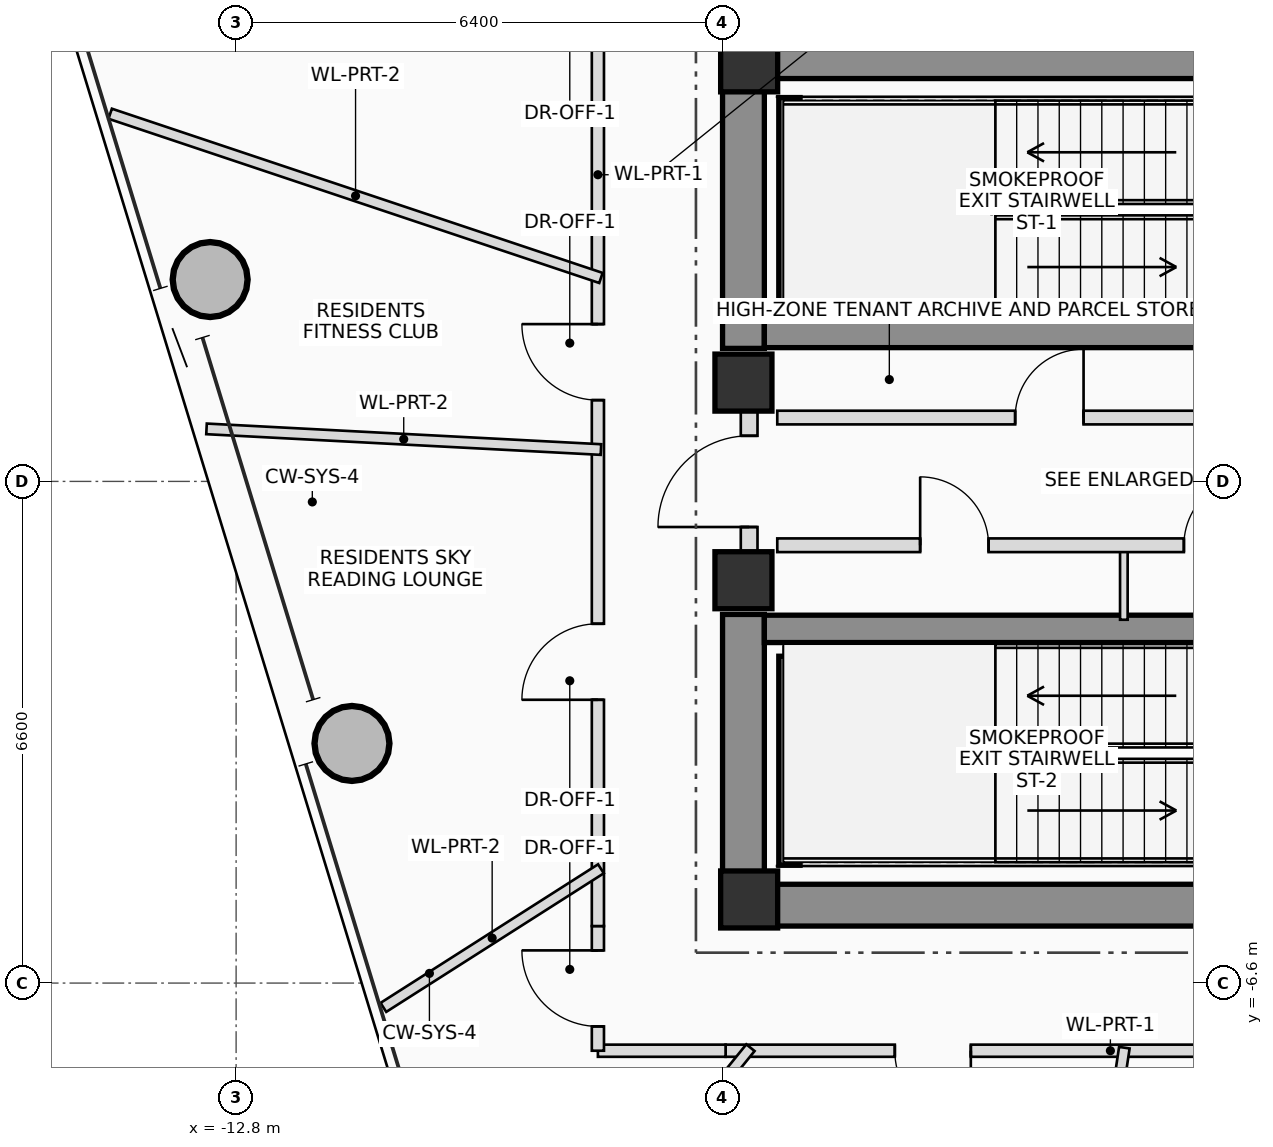
"""IFC4 building model, lengths in metres.
Left out: names, types, materials, properties, quantities, classifications, styles, units other than length and angle.
Written with IfcOpenShell. Run it as: python <this file> out.ifc"""

import sys

from ifc_helpers import new_model, si_unit, direction, frame, frame_2d, origin, origin_2d, place, context, subcontext, project, spatial, rectangle, hollow_circle, extrude, source, transform, mapped, element, fill, save


model = new_model("IFC4")
c1 = context("Model", 3, precision=1e-05, world=origin(), true_north=direction((0.0, 1.0)))
c2 = subcontext(c1, "Body", "Model", "MODEL_VIEW")
j1 = project(units=[si_unit("LENGTHUNIT", "METRE"), si_unit("PLANEANGLEUNIT", "RADIAN")], contexts=[c1])
p1 = place(None, origin())
s1 = spatial("IfcSite", under=j1, at=p1, CompositionType="ELEMENT")
p2 = place(p1, origin())
s2 = spatial("IfcBuilding", under=s1, at=p2, CompositionType="ELEMENT")
p3 = place(p2, frame((0.0, 0.0, 228.65)))
s3 = spatial("IfcBuildingStorey", under=s2, at=p3, CompositionType="ELEMENT", Elevation=228.65)
m1 = source(origin(), c2, "Body", "SweptSolid", [
    extrude(rectangle(XDim=0.75, YDim=0.75, at=origin_2d()), origin(), (0.0, 0.0, 1.0), 3.4),
])
for number, where, z_axis, x_axis in (
    (1, (-6.05, -5.5, 0.0), (0.0, 0.0, 1.0), (1.0, 0.0, 0.0)),
    (2, (-6.05, 5.5, 0.0), (0.0, 0.0, 1.0), (1.0, 0.0, 0.0)),
):
    element("IfcColumn", number, at=place(p3, frame(where, z_axis=z_axis, x_axis=x_axis)), inside=s3, PredefinedType="COLUMN", context=c2, shape_type="MappedRepresentation", body=[
        mapped(m1, transform((0.0, 0.0, 0.0), scale=1.0)),
    ])
p4 = place(p3, frame((-6.4, 5.575, 0.0), z_axis=(0.0, 0.0, 1.0), x_axis=(1.0, 0.0, 0.0)))
e3 = element("IfcWall", 3, at=p4, inside=s3, PredefinedType="SHEAR", context=c2, shape_type="SweptSolid", body=[
    extrude(rectangle(XDim=12.8, YDim=0.55, at=frame_2d((6.4, 0.0))), origin(), (0.0, 0.0, 1.0), 3.4),
])
p5 = place(p4, frame((8.6, 0.0, 0.0)))
e4 = element("IfcOpeningElement", 4, at=p5, cuts=e3, PredefinedType="OPENING", context=c2, shape_type="SweptSolid", body=[
    extrude(rectangle(XDim=1.2, YDim=2.2, at=frame_2d((0.6, 1.1))), frame((0.0, 0.285, 0.0), z_axis=(0.0, -1.0, 0.0), x_axis=(1.0, 0.0, 0.0)), (0.0, 0.0, 1.0), 0.57),
])
p6 = place(p3, frame((-6.4, -5.575, 0.0), z_axis=(0.0, 0.0, 1.0), x_axis=(1.0, 0.0, 0.0)))
e5 = element("IfcWall", 5, at=p6, inside=s3, PredefinedType="SHEAR", context=c2, shape_type="SweptSolid", body=[
    extrude(rectangle(XDim=12.8, YDim=0.55, at=frame_2d((6.4, 0.0))), origin(), (0.0, 0.0, 1.0), 3.4),
])
p7 = place(p6, frame((8.6, 0.0, 0.0)))
e6 = element("IfcOpeningElement", 6, at=p7, cuts=e5, PredefinedType="OPENING", context=c2, shape_type="SweptSolid", body=[
    extrude(rectangle(XDim=1.2, YDim=2.2, at=frame_2d((0.6, 1.1))), frame((0.0, 0.285, 0.0), z_axis=(0.0, -1.0, 0.0), x_axis=(1.0, 0.0, 0.0)), (0.0, 0.0, 1.0), 0.57),
])
for number, where, z_axis, x_axis in (
    (7, (-6.125, -5.3, 0.0), (0.0, 0.0, 1.0), (0.0, 1.0, 0.0)),
    (8, (-6.125, 1.75, 0.0), (0.0, 0.0, 1.0), (0.0, 1.0, 0.0)),
):
    element("IfcWall", number, at=place(p3, frame(where, z_axis=z_axis, x_axis=x_axis)), inside=s3, PredefinedType="SHEAR", context=c2, shape_type="SweptSolid", body=[
        extrude(rectangle(XDim=3.55, YDim=0.55, at=frame_2d((1.775, 0.0))), origin(), (0.0, 0.0, 1.0), 3.4),
    ])
for number, where, z_axis, x_axis in (
    (9, (-5.85, 1.94, 0.0), (0.0, 0.0, 1.0), (1.0, 0.0, 0.0)),
    (10, (-5.85, -1.94, 0.0), (0.0, 0.0, 1.0), (1.0, 0.0, 0.0)),
):
    element("IfcWall", number, at=place(p3, frame(where, z_axis=z_axis, x_axis=x_axis)), inside=s3, PredefinedType="SHEAR", context=c2, shape_type="SweptSolid", body=[
        extrude(rectangle(XDim=11.7, YDim=0.36, at=frame_2d((5.85, 0.0))), origin(), (0.0, 0.0, 1.0), 3.4),
    ])
for number, where, z_axis, x_axis in (
    (11, (-5.52, 2.3, 0.0), (0.0, 0.0, 1.0), (0.0, 1.0, 0.0)),
    (12, (-5.52, -5.05, 0.0), (0.0, 0.0, 1.0), (0.0, 1.0, 0.0)),
):
    element("IfcWall", number, at=place(p3, frame(where, z_axis=z_axis, x_axis=x_axis)), inside=s3, PredefinedType="SHEAR", context=c2, shape_type="SweptSolid", body=[
        extrude(rectangle(XDim=2.75, YDim=0.28, at=frame_2d((1.375, 0.0))), origin(), (0.0, 0.0, 1.0), 3.4),
    ])
for number, where, z_axis, x_axis in (
    (13, (-6.125, -1.3, 0.0), (0.0, 0.0, 1.0), (1.0, 0.0, 0.0)),
    (14, (-6.125, 1.3, 0.0), (0.0, 0.0, 1.0), (1.0, 0.0, 0.0)),
):
    element("IfcColumn", number, at=place(p3, frame(where, z_axis=z_axis, x_axis=x_axis)), inside=s3, PredefinedType="COLUMN", context=c2, shape_type="MappedRepresentation", body=[
        mapped(m1, transform((0.0, 0.0, 0.0), scale=1.0)),
    ])
m2 = source(origin(), c2, "Body", "SweptSolid", [
    extrude(hollow_circle(Radius=0.5, WallThickness=0.04, at=origin_2d()), origin(), (0.0, 0.0, 1.0), 3.4),
])
for number, where, z_axis, x_axis in (
    (15, (-13.142, 2.656, 0.0), (0.0, 0.0, 1.0), (1.0, 0.0, 0.0)),
    (16, (-11.276, -3.448, 0.0), (0.0, 0.0, 1.0), (1.0, 0.0, 0.0)),
):
    element("IfcColumn", number, at=place(p3, frame(where, z_axis=z_axis, x_axis=x_axis)), inside=s3, PredefinedType="COLUMN", context=c2, shape_type="MappedRepresentation", body=[
        mapped(m2, transform((0.0, 0.0, 0.0), scale=1.0)),
    ])
p8 = place(p3, frame((-6.05, -0.95, 0.0), z_axis=(0.0, 0.0, 1.0), x_axis=(0.0, 1.0, 0.0)))
e17 = element("IfcWall", 17, at=p8, inside=s3, PredefinedType="PLUMBINGWALL", context=c2, shape_type="SweptSolid", body=[
    extrude(rectangle(XDim=1.9, YDim=0.22, at=frame_2d((0.95, 0.0))), origin(), (0.0, 0.0, 1.0), 2.18),
])
p9 = place(p8, frame((0.35, 0.0, 0.0)))
e18 = element("IfcOpeningElement", 18, at=p9, cuts=e17, PredefinedType="OPENING", context=c2, shape_type="SweptSolid", body=[
    extrude(rectangle(XDim=1.2, YDim=2.2, at=frame_2d((0.6, 1.1))), frame((0.0, 0.12, 0.0), z_axis=(0.0, -1.0, 0.0), x_axis=(1.0, 0.0, 0.0)), (0.0, 0.0, 1.0), 0.24),
])
p10 = place(p3, frame((-1.12, -1.82, 0.0), z_axis=(0.0, 0.0, 1.0), x_axis=(0.0, 1.0, 0.0)))
e19 = element("IfcWall", 19, at=p10, inside=s3, PredefinedType="PARTITIONING", context=c2, shape_type="SweptSolid", body=[
    extrude(rectangle(XDim=0.98, YDim=0.1, at=frame_2d((0.49, 0.0))), origin(), (0.0, 0.0, 1.0), 3.2),
])
p11 = place(p3, frame((-5.68, 0.84, 0.0), z_axis=(0.0, 0.0, 1.0), x_axis=(1.0, 0.0, 0.0)))
e20 = element("IfcWall", 20, at=p11, inside=s3, PredefinedType="PLUMBINGWALL", context=c2, shape_type="SweptSolid", body=[
    extrude(rectangle(XDim=11.33, YDim=0.18, at=frame_2d((5.665, 0.0))), origin(), (0.0, 0.0, 1.0), 3.2),
])
p12 = place(p11, frame((3.13, 0.0, 0.0)))
e21 = element("IfcOpeningElement", 21, at=p12, cuts=e20, PredefinedType="OPENING", context=c2, shape_type="SweptSolid", body=[
    extrude(rectangle(XDim=0.9, YDim=2.05, at=frame_2d((0.45, 1.025))), frame((0.0, 0.1, 0.0), z_axis=(0.0, -1.0, 0.0), x_axis=(1.0, 0.0, 0.0)), (0.0, 0.0, 1.0), 0.2),
])
p13 = place(p11, frame((7.33, 0.0, 0.0)))
e22 = element("IfcOpeningElement", 22, at=p13, cuts=e20, PredefinedType="OPENING", context=c2, shape_type="SweptSolid", body=[
    extrude(rectangle(XDim=1.1, YDim=2.2, at=frame_2d((0.55, 1.1))), frame((0.0, 0.1, 0.0), z_axis=(0.0, -1.0, 0.0), x_axis=(1.0, 0.0, 0.0)), (0.0, 0.0, 1.0), 0.2),
])
p14 = place(p11, frame((8.83, 0.0, 0.0)))
e23 = element("IfcOpeningElement", 23, at=p14, cuts=e20, PredefinedType="OPENING", context=c2, shape_type="SweptSolid", body=[
    extrude(rectangle(XDim=1.1, YDim=2.2, at=frame_2d((0.55, 1.1))), frame((0.0, 0.1, 0.0), z_axis=(0.0, -1.0, 0.0), x_axis=(1.0, 0.0, 0.0)), (0.0, 0.0, 1.0), 0.2),
])
p15 = place(p3, frame((-5.68, -0.84, 0.0), z_axis=(0.0, 0.0, 1.0), x_axis=(1.0, 0.0, 0.0)))
e24 = element("IfcWall", 24, at=p15, inside=s3, PredefinedType="PLUMBINGWALL", context=c2, shape_type="SweptSolid", body=[
    extrude(rectangle(XDim=10.22, YDim=0.18, at=frame_2d((5.11, 0.0))), origin(), (0.0, 0.0, 1.0), 3.2),
])
p16 = place(p15, frame((1.88, 0.0, 0.0)))
e25 = element("IfcOpeningElement", 25, at=p16, cuts=e24, PredefinedType="OPENING", context=c2, shape_type="SweptSolid", body=[
    extrude(rectangle(XDim=0.9, YDim=2.05, at=frame_2d((0.45, 1.025))), frame((0.0, 0.1, 0.0), z_axis=(0.0, -1.0, 0.0), x_axis=(1.0, 0.0, 0.0)), (0.0, 0.0, 1.0), 0.2),
])
p17 = place(p15, frame((5.35, 0.0, 0.0)))
e26 = element("IfcOpeningElement", 26, at=p17, cuts=e24, PredefinedType="OPENING", context=c2, shape_type="SweptSolid", body=[
    extrude(rectangle(XDim=0.9, YDim=2.05, at=frame_2d((0.45, 1.025))), frame((0.0, 0.1, 0.0), z_axis=(0.0, -1.0, 0.0), x_axis=(1.0, 0.0, 0.0)), (0.0, 0.0, 1.0), 0.2),
])
p18 = place(p15, frame((7.33, 0.0, 0.0)))
e27 = element("IfcOpeningElement", 27, at=p18, cuts=e24, PredefinedType="OPENING", context=c2, shape_type="SweptSolid", body=[
    extrude(rectangle(XDim=1.1, YDim=2.2, at=frame_2d((0.55, 1.1))), frame((0.0, 0.1, 0.0), z_axis=(0.0, -1.0, 0.0), x_axis=(1.0, 0.0, 0.0)), (0.0, 0.0, 1.0), 0.2),
])
p19 = place(p15, frame((9.02, 0.0, 0.0)))
e28 = element("IfcOpeningElement", 28, at=p19, cuts=e24, PredefinedType="OPENING", context=c2, shape_type="SweptSolid", body=[
    extrude(rectangle(XDim=0.9, YDim=2.05, at=frame_2d((0.45, 1.025))), frame((0.0, 0.1, 0.0), z_axis=(0.0, -1.0, 0.0), x_axis=(1.0, 0.0, 0.0)), (0.0, 0.0, 1.0), 0.2),
])
p20 = place(p3, frame((3.45, -7.49, 0.0), z_axis=(0.0, 0.0, 1.0), x_axis=(-1.0, 0.0, 0.0)))
e29 = element("IfcWall", 29, at=p20, inside=s3, PredefinedType="PARTITIONING", context=c2, shape_type="SweptSolid", body=[
    extrude(rectangle(XDim=9.81, YDim=0.16, at=frame_2d((4.905, 0.0))), origin(), (0.0, 0.0, 1.0), 2.605),
])
p21 = place(p20, frame((1.911, 0.0, 0.0)))
e30 = element("IfcOpeningElement", 30, at=p21, cuts=e29, PredefinedType="OPENING", context=c2, shape_type="SweptSolid", body=[
    extrude(rectangle(XDim=1.0, YDim=2.25, at=frame_2d((0.5, 1.125))), frame((0.0, 0.09, 0.0), z_axis=(0.0, -1.0, 0.0), x_axis=(1.0, 0.0, 0.0)), (0.0, 0.0, 1.0), 0.18),
])
p22 = place(p20, frame((6.583, 0.0, 0.0)))
e31 = element("IfcOpeningElement", 31, at=p22, cuts=e29, PredefinedType="OPENING", context=c2, shape_type="SweptSolid", body=[
    extrude(rectangle(XDim=1.0, YDim=2.25, at=frame_2d((0.5, 1.125))), frame((0.0, 0.09, 0.0), z_axis=(0.0, -1.0, 0.0), x_axis=(1.0, 0.0, 0.0)), (0.0, 0.0, 1.0), 0.18),
])
p23 = place(p3, frame((-6.36, -7.49, 0.0), z_axis=(0.0, 0.0, 1.0), x_axis=(-1.0, 0.0, 0.0)))
e32 = element("IfcWall", 32, at=p23, inside=s3, PredefinedType="PARTITIONING", context=c2, shape_type="SweptSolid", body=[
    extrude(rectangle(XDim=1.68, YDim=0.16, at=frame_2d((0.84, 0.0))), origin(), (0.0, 0.0, 1.0), 2.605),
])
p24 = place(p3, frame((-8.04, -7.49, 0.0), z_axis=(0.0, 0.0, 1.0), x_axis=(0.0, 1.0, 0.0)))
e33 = element("IfcWall", 33, at=p24, inside=s3, PredefinedType="PARTITIONING", context=c2, shape_type="SweptSolid", body=[
    extrude(rectangle(XDim=1.64, YDim=0.16, at=frame_2d((0.82, 0.0))), origin(), (0.0, 0.0, 1.0), 2.805),
])
p25 = place(p24, frame((0.32, 0.0, 0.0)))
e34 = element("IfcOpeningElement", 34, at=p25, cuts=e33, PredefinedType="OPENING", context=c2, shape_type="SweptSolid", body=[
    extrude(rectangle(XDim=1.0, YDim=2.25, at=frame_2d((0.5, 1.125))), frame((0.0, 0.09, 0.0), z_axis=(0.0, -1.0, 0.0), x_axis=(1.0, 0.0, 0.0)), (0.0, 0.0, 1.0), 0.18),
])
p26 = place(p3, frame((-8.04, -5.85, 0.0), z_axis=(0.0, 0.0, 1.0), x_axis=(0.0, 1.0, 0.0)))
e35 = element("IfcWall", 35, at=p26, inside=s3, PredefinedType="PARTITIONING", context=c2, shape_type="SweptSolid", body=[
    extrude(rectangle(XDim=11.7, YDim=0.16, at=frame_2d((5.85, 0.0))), origin(), (0.0, 0.0, 1.0), 2.605),
])
p27 = place(p26, frame((2.977, 0.0, 0.0)))
e36 = element("IfcOpeningElement", 36, at=p27, cuts=e35, PredefinedType="OPENING", context=c2, shape_type="SweptSolid", body=[
    extrude(rectangle(XDim=1.0, YDim=2.25, at=frame_2d((0.5, 1.125))), frame((0.0, 0.09, 0.0), z_axis=(0.0, -1.0, 0.0), x_axis=(1.0, 0.0, 0.0)), (0.0, 0.0, 1.0), 0.18),
])
p28 = place(p26, frame((6.919, 0.0, 0.0)))
e37 = element("IfcOpeningElement", 37, at=p28, cuts=e35, PredefinedType="OPENING", context=c2, shape_type="SweptSolid", body=[
    extrude(rectangle(XDim=1.0, YDim=2.25, at=frame_2d((0.5, 1.125))), frame((0.0, 0.09, 0.0), z_axis=(0.0, -1.0, 0.0), x_axis=(1.0, 0.0, 0.0)), (0.0, 0.0, 1.0), 0.18),
])
p29 = place(p3, frame((-8.0, 2.677, 0.0), z_axis=(0.0, 0.0, 1.0), x_axis=(-0.948324112853, 0.317303288639, 0.0)))
e38 = element("IfcWall", 38, at=p29, inside=s3, PredefinedType="PARTITIONING", context=c2, shape_type="SweptSolid", body=[
    extrude(rectangle(XDim=6.809, YDim=0.14, at=frame_2d((3.404, 0.0))), origin(), (0.0, 0.0, 1.0), 2.605),
])
p30 = place(p3, frame((-8.0, 0.419, 0.0), z_axis=(0.0, 0.0, 1.0), x_axis=(-0.998629485047, 0.052336904702, 0.0)))
e39 = element("IfcWall", 39, at=p30, inside=s3, PredefinedType="PARTITIONING", context=c2, shape_type="SweptSolid", body=[
    extrude(rectangle(XDim=5.197, YDim=0.14, at=frame_2d((2.598, 0.0))), origin(), (0.0, 0.0, 1.0), 2.765),
])
p31 = place(p3, frame((-8.0, -5.097, 0.0), z_axis=(0.0, 0.0, 1.0), x_axis=(-0.843391828446, -0.537299007733, 0.0)))
e40 = element("IfcWall", 40, at=p31, inside=s3, PredefinedType="PARTITIONING", context=c2, shape_type="SweptSolid", body=[
    extrude(rectangle(XDim=3.394, YDim=0.14, at=frame_2d((1.697, 0.0))), origin(), (0.0, 0.0, 1.0), 2.765),
])
p32 = place(p3, frame((-6.033, -7.45, 0.0), z_axis=(0.0, 0.0, 1.0), x_axis=(-0.629318234002, -0.777147708195, 0.0)))
e41 = element("IfcWall", 41, at=p32, inside=s3, PredefinedType="PARTITIONING", context=c2, shape_type="SweptSolid", body=[
    extrude(rectangle(XDim=5.384, YDim=0.14, at=frame_2d((2.692, 0.0))), origin(), (0.0, 0.0, 1.0), 2.605),
])
p33 = place(p3, frame((-1.113, -7.45, 0.0), z_axis=(0.0, 0.0, 1.0), x_axis=(-0.147817313856, -0.989014682259, 0.0)))
e42 = element("IfcWall", 42, at=p33, inside=s3, PredefinedType="PARTITIONING", context=c2, shape_type="SweptSolid", body=[
    extrude(rectangle(XDim=10.384, YDim=0.14, at=frame_2d((5.192, 0.0))), origin(), (0.0, 0.0, 1.0), 2.805),
])
p34 = place(p9, origin())
e43 = element("IfcDoor", 43, at=p34, inside=s3, OperationType="SINGLE_SWING_LEFT", PredefinedType="DOOR", context=c2, shape_type="SweptSolid", body=[
    extrude(rectangle(XDim=1.2, YDim=2.2, at=frame_2d((0.6, 1.1))), frame((0.0, 0.025, 0.0), z_axis=(0.0, -1.0, 0.0), x_axis=(1.0, 0.0, 0.0)), (0.0, 0.0, 1.0), 0.05),
])
fill(e18, e43)
p35 = place(p12, origin())
e44 = element("IfcDoor", 44, at=p35, inside=s3, OperationType="SINGLE_SWING_RIGHT", PredefinedType="DOOR", context=c2, shape_type="SweptSolid", body=[
    extrude(rectangle(XDim=0.9, YDim=2.05, at=frame_2d((0.45, 1.025))), frame((0.0, 0.025, 0.0), z_axis=(0.0, -1.0, 0.0), x_axis=(1.0, 0.0, 0.0)), (0.0, 0.0, 1.0), 0.05),
])
fill(e21, e44)
p36 = place(p16, origin())
e45 = element("IfcDoor", 45, at=p36, inside=s3, OperationType="SINGLE_SWING_LEFT", PredefinedType="DOOR", context=c2, shape_type="SweptSolid", body=[
    extrude(rectangle(XDim=0.9, YDim=2.05, at=frame_2d((0.45, 1.025))), frame((0.0, 0.025, 0.0), z_axis=(0.0, -1.0, 0.0), x_axis=(1.0, 0.0, 0.0)), (0.0, 0.0, 1.0), 0.05),
])
fill(e25, e45)
p37 = place(p17, origin())
e46 = element("IfcDoor", 46, at=p37, inside=s3, OperationType="SINGLE_SWING_RIGHT", PredefinedType="DOOR", context=c2, shape_type="SweptSolid", body=[
    extrude(rectangle(XDim=0.9, YDim=2.05, at=frame_2d((0.45, 1.025))), frame((0.0, 0.025, 0.0), z_axis=(0.0, -1.0, 0.0), x_axis=(1.0, 0.0, 0.0)), (0.0, 0.0, 1.0), 0.05),
])
fill(e26, e46)
p38 = place(p22, origin())
e47 = element("IfcDoor", 47, at=p38, inside=s3, OperationType="SINGLE_SWING_LEFT", PredefinedType="DOOR", context=c2, shape_type="SweptSolid", body=[
    extrude(rectangle(XDim=1.0, YDim=2.25, at=frame_2d((0.5, 1.125))), frame((0.0, 0.025, 0.0), z_axis=(0.0, -1.0, 0.0), x_axis=(1.0, 0.0, 0.0)), (0.0, 0.0, 1.0), 0.05),
])
fill(e31, e47)
p39 = place(p25, origin())
e48 = element("IfcDoor", 48, at=p39, inside=s3, OperationType="SINGLE_SWING_RIGHT", PredefinedType="DOOR", context=c2, shape_type="SweptSolid", body=[
    extrude(rectangle(XDim=1.0, YDim=2.25, at=frame_2d((0.5, 1.125))), frame((0.0, 0.025, 0.0), z_axis=(0.0, -1.0, 0.0), x_axis=(1.0, 0.0, 0.0)), (0.0, 0.0, 1.0), 0.05),
])
fill(e34, e48)
p40 = place(p27, origin())
e49 = element("IfcDoor", 49, at=p40, inside=s3, OperationType="SINGLE_SWING_LEFT", PredefinedType="DOOR", context=c2, shape_type="SweptSolid", body=[
    extrude(rectangle(XDim=1.0, YDim=2.25, at=frame_2d((0.5, 1.125))), frame((0.0, 0.025, 0.0), z_axis=(0.0, -1.0, 0.0), x_axis=(1.0, 0.0, 0.0)), (0.0, 0.0, 1.0), 0.05),
])
fill(e36, e49)
p41 = place(p28, origin())
e50 = element("IfcDoor", 50, at=p41, inside=s3, OperationType="SINGLE_SWING_RIGHT", PredefinedType="DOOR", context=c2, shape_type="SweptSolid", body=[
    extrude(rectangle(XDim=1.0, YDim=2.25, at=frame_2d((0.5, 1.125))), frame((0.0, 0.025, 0.0), z_axis=(0.0, -1.0, 0.0), x_axis=(1.0, 0.0, 0.0)), (0.0, 0.0, 1.0), 0.05),
])
fill(e37, e50)
save(model, sys.argv[1])
